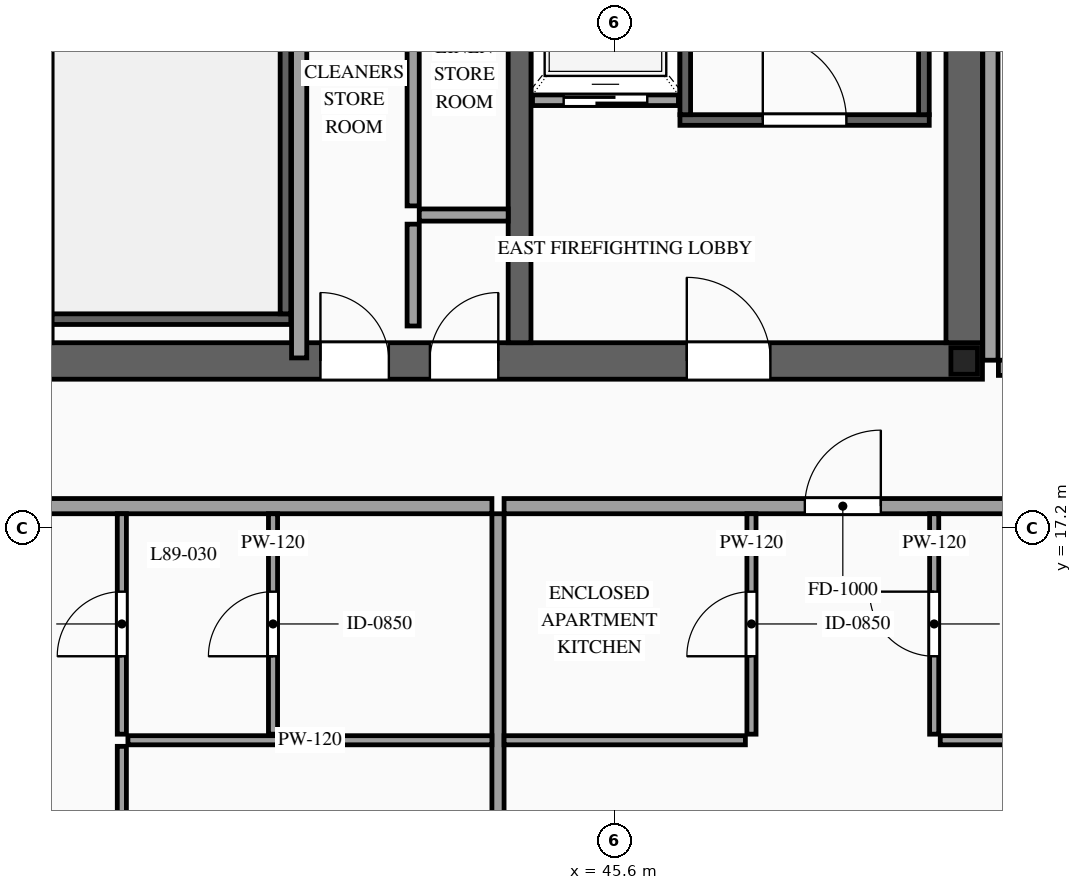
"""IFC4 building model, lengths in metres.
Left out: names, types, materials, properties, quantities, classifications, styles, units other than length and angle.
Written with IfcOpenShell. Run it as: python <this file> out.ifc"""

import sys

from ifc_helpers import new_model, si_unit, direction, frame, frame_2d, origin, origin_2d, place, context, subcontext, project, spatial, rectangle, i_section, extrude, source, transform, mapped, element, fill, save


model = new_model("IFC4")
c1 = context("Model", 3, precision=1e-05, world=origin(), true_north=direction((0.0, 1.0)))
c2 = subcontext(c1, "Body", "Model", "MODEL_VIEW")
j1 = project(units=[si_unit("LENGTHUNIT", "METRE"), si_unit("PLANEANGLEUNIT", "RADIAN")], contexts=[c1])
p1 = place(None, origin())
s1 = spatial("IfcSite", under=j1, at=p1, CompositionType="ELEMENT")
p2 = place(p1, origin())
s2 = spatial("IfcBuilding", under=s1, at=p2, CompositionType="ELEMENT")
p3 = place(p2, frame((0.0, 0.0, 332.2)))
s3 = spatial("IfcBuildingStorey", under=s2, at=p3, CompositionType="ELEMENT", Elevation=332.2)
p4 = place(p3, frame((23.56, 19.4, 0.0), z_axis=(0.0, 0.0, 1.0), x_axis=(1.0, 0.0, 0.0)))
e1 = element("IfcWall", 1, at=p4, inside=s3, PredefinedType="SHEAR", context=c2, shape_type="SweptSolid", body=[
    extrude(rectangle(XDim=26.88, YDim=0.48, at=frame_2d((13.44, 0.0))), origin(), (0.0, 0.0, 1.0), 3.5),
])
p5 = place(p4, frame((1.89, 0.0, 0.0)))
e2 = element("IfcOpeningElement", 2, at=p5, cuts=e1, PredefinedType="OPENING", context=c2, shape_type="SweptSolid", body=[
    extrude(rectangle(XDim=1.1, YDim=2.2, at=frame_2d((0.55, 1.1))), frame((0.0, 0.255, 0.0), z_axis=(0.0, -1.0, 0.0), x_axis=(1.0, 0.0, 0.0)), (0.0, 0.0, 1.0), 0.51),
])
p6 = place(p4, frame((9.79, 0.0, 0.0)))
e3 = element("IfcOpeningElement", 3, at=p6, cuts=e1, PredefinedType="OPENING", context=c2, shape_type="SweptSolid", body=[
    extrude(rectangle(XDim=1.1, YDim=2.2, at=frame_2d((0.55, 1.1))), frame((0.0, 0.255, 0.0), z_axis=(0.0, -1.0, 0.0), x_axis=(1.0, 0.0, 0.0)), (0.0, 0.0, 1.0), 0.51),
])
p7 = place(p4, frame((22.99, 0.0, 0.0)))
e4 = element("IfcOpeningElement", 4, at=p7, cuts=e1, PredefinedType="OPENING", context=c2, shape_type="SweptSolid", body=[
    extrude(rectangle(XDim=1.1, YDim=2.2, at=frame_2d((0.55, 1.1))), frame((0.0, 0.255, 0.0), z_axis=(0.0, -1.0, 0.0), x_axis=(1.0, 0.0, 0.0)), (0.0, 0.0, 1.0), 0.51),
])
p8 = place(p4, frame((19.61, 0.0, 0.0)))
e5 = element("IfcOpeningElement", 5, at=p8, cuts=e1, PredefinedType="OPENING", context=c2, shape_type="SweptSolid", body=[
    extrude(rectangle(XDim=0.9, YDim=2.15, at=frame_2d((0.45, 1.075))), frame((0.0, 0.255, 0.0), z_axis=(0.0, -1.0, 0.0), x_axis=(1.0, 0.0, 0.0)), (0.0, 0.0, 1.0), 0.51),
])
p9 = place(p4, frame((18.17, 0.0, 0.0)))
e6 = element("IfcOpeningElement", 6, at=p9, cuts=e1, PredefinedType="OPENING", context=c2, shape_type="SweptSolid", body=[
    extrude(rectangle(XDim=0.9, YDim=2.15, at=frame_2d((0.45, 1.075))), frame((0.0, 0.255, 0.0), z_axis=(0.0, -1.0, 0.0), x_axis=(1.0, 0.0, 0.0)), (0.0, 0.0, 1.0), 0.51),
])
m1 = source(origin(), c2, "Body", "SweptSolid", [
    extrude(rectangle(XDim=12.32, YDim=0.48, at=frame_2d((6.16, 0.0))), origin(), (0.0, 0.0, 1.0), 3.5),
])
p10 = place(p3, frame((50.2, 19.64, 0.0), z_axis=(0.0, 0.0, 1.0), x_axis=(0.0, 1.0, 0.0)))
e7 = element("IfcWall", 7, at=p10, inside=s3, PredefinedType="SHEAR", context=c2, shape_type="MappedRepresentation", body=[
    mapped(m1, transform((0.0, 0.0, 0.0), scale=1.0)),
])
m2 = source(origin(), c2, "Body", "SweptSolid", [
    extrude(rectangle(XDim=12.32, YDim=0.3, at=frame_2d((6.16, 0.0))), origin(), (0.0, 0.0, 1.0), 3.5),
])
p11 = place(p3, frame((38.05, 19.64, 0.0), z_axis=(0.0, 0.0, 1.0), x_axis=(0.0, 1.0, 0.0)))
e8 = element("IfcWall", 8, at=p11, inside=s3, PredefinedType="SOLIDWALL", context=c2, shape_type="MappedRepresentation", body=[
    mapped(m2, transform((0.0, 0.0, 0.0), scale=1.0)),
])
p12 = place(p3, frame((44.35, 19.64, 0.0), z_axis=(0.0, 0.0, 1.0), x_axis=(0.0, 1.0, 0.0)))
e9 = element("IfcWall", 9, at=p12, inside=s3, PredefinedType="SOLIDWALL", context=c2, shape_type="SweptSolid", body=[
    extrude(rectangle(XDim=12.32, YDim=0.3, at=frame_2d((6.16, 0.0))), origin(), (0.0, 0.0, 1.0), 3.5),
])
p13 = place(p12, frame((6.56, 0.0, 0.0)))
e10 = element("IfcOpeningElement", 10, at=p13, cuts=e9, PredefinedType="OPENING", context=c2, shape_type="SweptSolid", body=[
    extrude(rectangle(XDim=1.1, YDim=2.2, at=frame_2d((0.55, 1.1))), frame((0.0, 0.165, 0.0), z_axis=(0.0, -1.0, 0.0), x_axis=(1.0, 0.0, 0.0)), (0.0, 0.0, 1.0), 0.33),
])
p14 = place(p12, frame((8.66, 0.0, 0.0)))
e11 = element("IfcOpeningElement", 11, at=p14, cuts=e9, PredefinedType="OPENING", context=c2, shape_type="SweptSolid", body=[
    extrude(rectangle(XDim=1.1, YDim=2.2, at=frame_2d((0.55, 1.1))), frame((0.0, 0.165, 0.0), z_axis=(0.0, -1.0, 0.0), x_axis=(1.0, 0.0, 0.0)), (0.0, 0.0, 1.0), 0.33),
])
p15 = place(p12, frame((10.76, 0.0, 0.0)))
e12 = element("IfcOpeningElement", 12, at=p15, cuts=e9, PredefinedType="OPENING", context=c2, shape_type="SweptSolid", body=[
    extrude(rectangle(XDim=1.1, YDim=2.2, at=frame_2d((0.55, 1.1))), frame((0.0, 0.165, 0.0), z_axis=(0.0, -1.0, 0.0), x_axis=(1.0, 0.0, 0.0)), (0.0, 0.0, 1.0), 0.33),
])
m3 = source(origin(), c2, "Body", "SweptSolid", [
    extrude(i_section(OverallWidth=0.35, OverallDepth=0.35, WebThickness=0.012, FlangeThickness=0.019, at=origin_2d()), origin(), (0.0, 0.0, 1.0), 3.5),
])
p16 = place(p3, frame((50.2, 19.4, 0.0), z_axis=(0.0, 0.0, 1.0), x_axis=(1.0, 0.0, 0.0)))
e13 = element("IfcColumn", 13, at=p16, inside=s3, PredefinedType="COLUMN", context=c2, shape_type="MappedRepresentation", body=[
    mapped(m3, transform((0.0, 0.0, 0.0), scale=1.0)),
])
p17 = place(p3, frame((44.52, 22.83, 0.0), z_axis=(0.0, 0.0, 1.0), x_axis=(1.0, 0.0, 0.0)))
e14 = element("IfcWall", 14, at=p17, inside=s3, PredefinedType="SOLIDWALL", context=c2, shape_type="SweptSolid", body=[
    extrude(rectangle(XDim=1.92, YDim=0.14, at=frame_2d((0.96, 0.0))), origin(), (0.0, 0.0, 1.0), 3.28),
])
p18 = place(p17, frame((0.41, 0.0, 0.0)))
e15 = element("IfcOpeningElement", 15, at=p18, cuts=e14, PredefinedType="OPENING", context=c2, shape_type="SweptSolid", body=[
    extrude(rectangle(XDim=1.1, YDim=2.2, at=frame_2d((0.55, 1.1))), frame((0.0, 0.085, 0.0), z_axis=(0.0, -1.0, 0.0), x_axis=(1.0, 0.0, 0.0)), (0.0, 0.0, 1.0), 0.17),
])
p19 = place(p3, frame((46.46, 22.57, 0.0), z_axis=(0.0, 0.0, 1.0), x_axis=(1.0, 0.0, 0.0)))
e16 = element("IfcWall", 16, at=p19, inside=s3, PredefinedType="SOLIDWALL", context=c2, shape_type="SweptSolid", body=[
    extrude(rectangle(XDim=3.28, YDim=0.14, at=frame_2d((1.64, 0.0))), origin(), (0.0, 0.0, 1.0), 3.28),
])
p20 = place(p19, frame((1.09, 0.0, 0.0)))
e17 = element("IfcOpeningElement", 17, at=p20, cuts=e16, PredefinedType="OPENING", context=c2, shape_type="SweptSolid", body=[
    extrude(rectangle(XDim=1.1, YDim=2.2, at=frame_2d((0.55, 1.1))), frame((0.0, 0.085, 0.0), z_axis=(0.0, -1.0, 0.0), x_axis=(1.0, 0.0, 0.0)), (0.0, 0.0, 1.0), 0.17),
])
m4 = source(origin(), c2, "Body", "SweptSolid", [
    extrude(rectangle(XDim=8.94, YDim=0.14, at=frame_2d((4.47, 0.0))), origin(), (0.0, 0.0, 1.0), 3.28),
])
for number, where, z_axis, x_axis in (
    (18, (46.53, 22.64, 0.0), (0.0, 0.0, 1.0), (0.0, 1.0, 0.0)),
    (19, (49.67, 22.64, 0.0), (0.0, 0.0, 1.0), (0.0, 1.0, 0.0)),
):
    element("IfcWall", number, at=place(p3, frame(where, z_axis=z_axis, x_axis=x_axis)), inside=s3, PredefinedType="SOLIDWALL", context=c2, shape_type="MappedRepresentation", body=[
        mapped(m4, transform((0.0, 0.0, 0.0), scale=1.0)),
    ])
m5 = source(origin(), c2, "Body", "SweptSolid", [
    extrude(rectangle(XDim=3.14, YDim=0.14, at=frame_2d((1.57, 0.0))), origin(), (0.0, 0.0, 1.0), 3.28),
])
p21 = place(p3, frame((38.2, 19.95, 0.0), z_axis=(0.0, 0.0, 1.0), x_axis=(1.0, 0.0, 0.0)))
e20 = element("IfcWall", 20, at=p21, inside=s3, PredefinedType="SOLIDWALL", context=c2, shape_type="MappedRepresentation", body=[
    mapped(m5, transform((0.0, 0.0, 0.0), scale=1.0)),
])
m6 = source(origin(), c2, "Body", "SweptSolid", [
    extrude(rectangle(XDim=8.94, YDim=0.14, at=frame_2d((4.47, 0.0))), origin(), (0.0, 0.0, 1.0), 3.28),
])
p22 = place(p3, frame((41.27, 20.02, 0.0), z_axis=(0.0, 0.0, 1.0), x_axis=(0.0, 1.0, 0.0)))
e21 = element("IfcWall", 21, at=p22, inside=s3, PredefinedType="SOLIDWALL", context=c2, shape_type="MappedRepresentation", body=[
    mapped(m6, transform((0.0, 0.0, 0.0), scale=1.0)),
])
m7 = source(origin(), c2, "Body", "SweptSolid", [
    extrude(rectangle(XDim=1.34, YDim=0.16, at=frame_2d((0.67, 0.0))), origin(), (0.0, 0.0, 1.0), 3.28),
])
p23 = place(p3, frame((42.95, 19.86, 0.0), z_axis=(0.0, 0.0, 1.0), x_axis=(0.0, 1.0, 0.0)))
e22 = element("IfcWall", 22, at=p23, inside=s3, PredefinedType="PARTITIONING", context=c2, shape_type="MappedRepresentation", body=[
    mapped(m7, transform((0.0, 0.0, 0.0), scale=1.0)),
])
m8 = source(origin(), c2, "Body", "SweptSolid", [
    extrude(rectangle(XDim=1.17, YDim=0.16, at=frame_2d((0.585, 0.0))), origin(), (0.0, 0.0, 1.0), 3.28),
])
p24 = place(p3, frame((43.03, 21.32, 0.0), z_axis=(0.0, 0.0, 1.0), x_axis=(1.0, 0.0, 0.0)))
e23 = element("IfcWall", 23, at=p24, inside=s3, PredefinedType="PARTITIONING", context=c2, shape_type="MappedRepresentation", body=[
    mapped(m8, transform((0.0, 0.0, 0.0), scale=1.0)),
])
m9 = source(origin(), c2, "Body", "SweptSolid", [
    extrude(rectangle(XDim=6.06, YDim=0.2, at=frame_2d((3.03, 0.0))), origin(), (0.0, 0.0, 1.0), 3.28),
])
p25 = place(p3, frame((41.45, 19.44, 0.0), z_axis=(0.0, 0.0, 1.0), x_axis=(0.0, 1.0, 0.0)))
e24 = element("IfcWall", 24, at=p25, inside=s3, PredefinedType="PARTITIONING", context=c2, shape_type="MappedRepresentation", body=[
    mapped(m9, transform((0.0, 0.0, 0.0), scale=1.0)),
])
m10 = source(origin(), c2, "Body", "SweptSolid", [
    extrude(rectangle(XDim=4.06, YDim=0.16, at=frame_2d((2.03, 0.0))), origin(), (0.0, 0.0, 1.0), 3.28),
])
p26 = place(p3, frame((42.95, 21.44, 0.0), z_axis=(0.0, 0.0, 1.0), x_axis=(0.0, 1.0, 0.0)))
e25 = element("IfcWall", 25, at=p26, inside=s3, PredefinedType="PARTITIONING", context=c2, shape_type="MappedRepresentation", body=[
    mapped(m10, transform((0.0, 0.0, 0.0), scale=1.0)),
])
p27 = place(p3, frame((32.583, 17.49, 0.0), z_axis=(0.0, 0.0, 1.0), x_axis=(1.0, 0.0, 0.0)))
e26 = element("IfcWall", 26, at=p27, inside=s3, PredefinedType="PARTITIONING", context=c2, shape_type="SweptSolid", body=[
    extrude(rectangle(XDim=11.403, YDim=0.2, at=frame_2d((5.702, 0.0))), origin(), (0.0, 0.0, 1.0), 3.28),
])
p28 = place(p27, frame((4.517, 0.0, 0.0)))
e27 = element("IfcOpeningElement", 27, at=p28, cuts=e26, PredefinedType="OPENING", context=c2, shape_type="SweptSolid", body=[
    extrude(rectangle(XDim=1.0, YDim=2.2, at=frame_2d((0.5, 1.1))), frame((0.0, 0.115, 0.0), z_axis=(0.0, -1.0, 0.0), x_axis=(1.0, 0.0, 0.0)), (0.0, 0.0, 1.0), 0.23),
])
m11 = source(origin(), c2, "Body", "SweptSolid", [
    extrude(rectangle(XDim=10.54, YDim=0.16, at=frame_2d((5.27, 0.0))), origin(), (0.0, 0.0, 1.0), 3.28),
])
p29 = place(p3, frame((44.066, 6.85, 0.0), z_axis=(0.0, 0.0, 1.0), x_axis=(0.0, 1.0, 0.0)))
e28 = element("IfcWall", 28, at=p29, inside=s3, PredefinedType="PARTITIONING", context=c2, shape_type="MappedRepresentation", body=[
    mapped(m11, transform((0.0, 0.0, 0.0), scale=1.0)),
])
p30 = place(p3, frame((41.106, 14.49, 0.0), z_axis=(0.0, 0.0, 1.0), x_axis=(0.0, 1.0, 0.0)))
e29 = element("IfcWall", 29, at=p30, inside=s3, PredefinedType="PARTITIONING", context=c2, shape_type="SweptSolid", body=[
    extrude(rectangle(XDim=2.9, YDim=0.12, at=frame_2d((1.45, 0.0))), origin(), (0.0, 0.0, 1.0), 3.28),
])
p31 = place(p30, frame((1.025, 0.0, 0.0)))
e30 = element("IfcOpeningElement", 30, at=p31, cuts=e29, PredefinedType="OPENING", context=c2, shape_type="SweptSolid", body=[
    extrude(rectangle(XDim=0.85, YDim=2.1, at=frame_2d((0.425, 1.05))), frame((0.0, 0.075, 0.0), z_axis=(0.0, -1.0, 0.0), x_axis=(1.0, 0.0, 0.0)), (0.0, 0.0, 1.0), 0.15),
])
m12 = source(origin(), c2, "Body", "SweptSolid", [
    extrude(rectangle(XDim=4.789, YDim=0.12, at=frame_2d((2.395, 0.0))), origin(), (0.0, 0.0, 1.0), 3.28),
])
p32 = place(p3, frame((39.197, 14.41, 0.0), z_axis=(0.0, 0.0, 1.0), x_axis=(1.0, 0.0, 0.0)))
e31 = element("IfcWall", 31, at=p32, inside=s3, PredefinedType="PARTITIONING", context=c2, shape_type="MappedRepresentation", body=[
    mapped(m12, transform((0.0, 0.0, 0.0), scale=1.0)),
])
p33 = place(p3, frame((39.117, 6.85, 0.0), z_axis=(0.0, 0.0, 1.0), x_axis=(0.0, 1.0, 0.0)))
e32 = element("IfcWall", 32, at=p33, inside=s3, PredefinedType="PARTITIONING", context=c2, shape_type="SweptSolid", body=[
    extrude(rectangle(XDim=7.48, YDim=0.12, at=frame_2d((3.74, 0.0))), origin(), (0.0, 0.0, 1.0), 3.28),
])
p34 = place(p33, frame((3.29, 0.0, 0.0)))
e33 = element("IfcOpeningElement", 33, at=p34, cuts=e32, PredefinedType="OPENING", context=c2, shape_type="SweptSolid", body=[
    extrude(rectangle(XDim=0.9, YDim=2.15, at=frame_2d((0.45, 1.075))), frame((0.0, 0.075, 0.0), z_axis=(0.0, -1.0, 0.0), x_axis=(1.0, 0.0, 0.0)), (0.0, 0.0, 1.0), 0.15),
])
p35 = place(p3, frame((39.117, 14.49, 0.0), z_axis=(0.0, 0.0, 1.0), x_axis=(0.0, 1.0, 0.0)))
e34 = element("IfcWall", 34, at=p35, inside=s3, PredefinedType="PARTITIONING", context=c2, shape_type="SweptSolid", body=[
    extrude(rectangle(XDim=2.9, YDim=0.12, at=frame_2d((1.45, 0.0))), origin(), (0.0, 0.0, 1.0), 3.28),
])
p36 = place(p35, frame((1.025, 0.0, 0.0)))
e35 = element("IfcOpeningElement", 35, at=p36, cuts=e34, PredefinedType="OPENING", context=c2, shape_type="SweptSolid", body=[
    extrude(rectangle(XDim=0.85, YDim=2.1, at=frame_2d((0.425, 1.05))), frame((0.0, 0.075, 0.0), z_axis=(0.0, -1.0, 0.0), x_axis=(1.0, 0.0, 0.0)), (0.0, 0.0, 1.0), 0.15),
])
p37 = place(p3, frame((44.146, 17.49, 0.0), z_axis=(0.0, 0.0, 1.0), x_axis=(1.0, 0.0, 0.0)))
e36 = element("IfcWall", 36, at=p37, inside=s3, PredefinedType="PARTITIONING", context=c2, shape_type="SweptSolid", body=[
    extrude(rectangle(XDim=8.914, YDim=0.2, at=frame_2d((4.457, 0.0))), origin(), (0.0, 0.0, 1.0), 3.28),
])
p38 = place(p37, frame((3.957, 0.0, 0.0)))
e37 = element("IfcOpeningElement", 37, at=p38, cuts=e36, PredefinedType="OPENING", context=c2, shape_type="SweptSolid", body=[
    extrude(rectangle(XDim=1.0, YDim=2.2, at=frame_2d((0.5, 1.1))), frame((0.0, 0.115, 0.0), z_axis=(0.0, -1.0, 0.0), x_axis=(1.0, 0.0, 0.0)), (0.0, 0.0, 1.0), 0.23),
])
m13 = source(origin(), c2, "Body", "SweptSolid", [
    extrude(rectangle(XDim=3.175, YDim=0.12, at=frame_2d((1.587, 0.0))), origin(), (0.0, 0.0, 1.0), 3.28),
])
p39 = place(p3, frame((44.146, 14.41, 0.0), z_axis=(0.0, 0.0, 1.0), x_axis=(1.0, 0.0, 0.0)))
e38 = element("IfcWall", 38, at=p39, inside=s3, PredefinedType="PARTITIONING", context=c2, shape_type="MappedRepresentation", body=[
    mapped(m13, transform((0.0, 0.0, 0.0), scale=1.0)),
])
p40 = place(p3, frame((47.401, 14.49, 0.0), z_axis=(0.0, 0.0, 1.0), x_axis=(0.0, 1.0, 0.0)))
e39 = element("IfcWall", 39, at=p40, inside=s3, PredefinedType="PARTITIONING", context=c2, shape_type="SweptSolid", body=[
    extrude(rectangle(XDim=2.9, YDim=0.12, at=frame_2d((1.45, 0.0))), origin(), (0.0, 0.0, 1.0), 3.28),
])
p41 = place(p40, frame((1.025, 0.0, 0.0)))
e40 = element("IfcOpeningElement", 40, at=p41, cuts=e39, PredefinedType="OPENING", context=c2, shape_type="SweptSolid", body=[
    extrude(rectangle(XDim=0.85, YDim=2.1, at=frame_2d((0.425, 1.05))), frame((0.0, 0.075, 0.0), z_axis=(0.0, -1.0, 0.0), x_axis=(1.0, 0.0, 0.0)), (0.0, 0.0, 1.0), 0.15),
])
p42 = place(p3, frame((49.885, 14.41, 0.0), z_axis=(0.0, 0.0, 1.0), x_axis=(1.0, 0.0, 0.0)))
e41 = element("IfcWall", 41, at=p42, inside=s3, PredefinedType="PARTITIONING", context=c2, shape_type="MappedRepresentation", body=[
    mapped(m13, transform((0.0, 0.0, 0.0), scale=1.0)),
])
p43 = place(p3, frame((49.805, 14.49, 0.0), z_axis=(0.0, 0.0, 1.0), x_axis=(0.0, 1.0, 0.0)))
e42 = element("IfcWall", 42, at=p43, inside=s3, PredefinedType="PARTITIONING", context=c2, shape_type="SweptSolid", body=[
    extrude(rectangle(XDim=2.9, YDim=0.12, at=frame_2d((1.45, 0.0))), origin(), (0.0, 0.0, 1.0), 3.28),
])
p44 = place(p43, frame((1.025, 0.0, 0.0)))
e43 = element("IfcOpeningElement", 43, at=p44, cuts=e42, PredefinedType="OPENING", context=c2, shape_type="SweptSolid", body=[
    extrude(rectangle(XDim=0.85, YDim=2.1, at=frame_2d((0.425, 1.05))), frame((0.0, 0.075, 0.0), z_axis=(0.0, -1.0, 0.0), x_axis=(1.0, 0.0, 0.0)), (0.0, 0.0, 1.0), 0.15),
])
p45 = place(p3, frame((50.65, 19.31, 0.0), z_axis=(0.0, 0.0, 1.0), x_axis=(1.0, 0.0, 0.0)))
e44 = element("IfcWall", 44, at=p45, inside=s3, PredefinedType="PARTITIONING", context=c2, shape_type="SweptSolid", body=[
    extrude(rectangle(XDim=5.3, YDim=0.2, at=frame_2d((2.65, 0.0))), origin(), (0.0, 0.0, 1.0), 2.825),
])
p46 = place(p45, frame((0.4, 0.0, 0.0)))
e45 = element("IfcOpeningElement", 45, at=p46, cuts=e44, PredefinedType="OPENING", context=c2, shape_type="SweptSolid", body=[
    extrude(rectangle(XDim=1.0, YDim=2.2, at=frame_2d((0.5, 1.1))), frame((0.0, 0.115, 0.0), z_axis=(0.0, -1.0, 0.0), x_axis=(1.0, 0.0, 0.0)), (0.0, 0.0, 1.0), 0.23),
])
m14 = source(origin(), c2, "Body", "SweptSolid", [
    extrude(rectangle(XDim=12.78, YDim=0.2, at=frame_2d((6.39, 0.0))), origin(), (0.0, 0.0, 1.0), 3.28),
])
p47 = place(p3, frame((50.545, 19.41, 0.0), z_axis=(0.0, 0.0, 1.0), x_axis=(0.0, 1.0, 0.0)))
e46 = element("IfcWall", 46, at=p47, inside=s3, PredefinedType="PARTITIONING", context=c2, shape_type="MappedRepresentation", body=[
    mapped(m14, transform((0.0, 0.0, 0.0), scale=1.0)),
])
m15 = source(origin(), c2, "Body", "SweptSolid", [
    extrude(rectangle(XDim=1.1, YDim=2.2, at=frame_2d((0.55, 1.1))), frame((0.0, 0.025, 0.0), z_axis=(0.0, -1.0, 0.0), x_axis=(1.0, 0.0, 0.0)), (0.0, 0.0, 1.0), 0.05),
])
p48 = place(p18, origin())
e47 = element("IfcDoor", 47, at=p48, inside=s3, OperationType="SLIDING_TO_RIGHT", PredefinedType="DOOR", context=c2, shape_type="MappedRepresentation", body=[
    mapped(m15, transform((0.0, 0.0, 0.0), scale=1.0)),
])
fill(e15, e47)
m16 = source(origin(), c2, "Body", "SweptSolid", [
    extrude(rectangle(XDim=1.1, YDim=2.2, at=frame_2d((0.55, 1.1))), frame((0.0, 0.025, 0.0), z_axis=(0.0, -1.0, 0.0), x_axis=(1.0, 0.0, 0.0)), (0.0, 0.0, 1.0), 0.05),
])
p49 = place(p20, origin())
e48 = element("IfcDoor", 48, at=p49, inside=s3, OperationType="SINGLE_SWING_LEFT", PredefinedType="DOOR", context=c2, shape_type="MappedRepresentation", body=[
    mapped(m16, transform((0.0, 0.0, 0.0), scale=1.0)),
])
fill(e17, e48)
p50 = place(p7, origin())
e49 = element("IfcDoor", 49, at=p50, inside=s3, OperationType="SINGLE_SWING_LEFT", PredefinedType="DOOR", context=c2, shape_type="MappedRepresentation", body=[
    mapped(m16, transform((0.0, 0.0, 0.0), scale=1.0)),
])
fill(e4, e49)
m17 = source(origin(), c2, "Body", "SweptSolid", [
    extrude(rectangle(XDim=0.9, YDim=2.15, at=frame_2d((0.45, 1.075))), frame((0.0, 0.025, 0.0), z_axis=(0.0, -1.0, 0.0), x_axis=(1.0, 0.0, 0.0)), (0.0, 0.0, 1.0), 0.05),
])
p51 = place(p8, origin())
e50 = element("IfcDoor", 50, at=p51, inside=s3, OperationType="SINGLE_SWING_RIGHT", PredefinedType="DOOR", context=c2, shape_type="MappedRepresentation", body=[
    mapped(m17, transform((0.0, 0.0, 0.0), scale=1.0)),
])
fill(e5, e50)
p52 = place(p9, origin())
e51 = element("IfcDoor", 51, at=p52, inside=s3, OperationType="SINGLE_SWING_LEFT", PredefinedType="DOOR", context=c2, shape_type="MappedRepresentation", body=[
    mapped(m17, transform((0.0, 0.0, 0.0), scale=1.0)),
])
fill(e6, e51)
m18 = source(origin(), c2, "Body", "SweptSolid", [
    extrude(rectangle(XDim=0.85, YDim=2.1, at=frame_2d((0.425, 1.05))), frame((0.0, 0.025, 0.0), z_axis=(0.0, -1.0, 0.0), x_axis=(1.0, 0.0, 0.0)), (0.0, 0.0, 1.0), 0.05),
])
p53 = place(p31, origin())
e52 = element("IfcDoor", 52, at=p53, inside=s3, OperationType="SINGLE_SWING_LEFT", PredefinedType="DOOR", context=c2, shape_type="MappedRepresentation", body=[
    mapped(m18, transform((0.0, 0.0, 0.0), scale=1.0)),
])
fill(e30, e52)
p54 = place(p36, origin())
e53 = element("IfcDoor", 53, at=p54, inside=s3, OperationType="SINGLE_SWING_LEFT", PredefinedType="DOOR", context=c2, shape_type="MappedRepresentation", body=[
    mapped(m18, transform((0.0, 0.0, 0.0), scale=1.0)),
])
fill(e35, e53)
m19 = source(origin(), c2, "Body", "SweptSolid", [
    extrude(rectangle(XDim=1.0, YDim=2.2, at=frame_2d((0.5, 1.1))), frame((0.0, 0.025, 0.0), z_axis=(0.0, -1.0, 0.0), x_axis=(1.0, 0.0, 0.0)), (0.0, 0.0, 1.0), 0.05),
])
p55 = place(p38, origin())
e54 = element("IfcDoor", 54, at=p55, inside=s3, OperationType="SINGLE_SWING_RIGHT", PredefinedType="DOOR", context=c2, shape_type="MappedRepresentation", body=[
    mapped(m19, transform((0.0, 0.0, 0.0), scale=1.0)),
])
fill(e37, e54)
p56 = place(p41, origin())
e55 = element("IfcDoor", 55, at=p56, inside=s3, OperationType="SINGLE_SWING_LEFT", PredefinedType="DOOR", context=c2, shape_type="MappedRepresentation", body=[
    mapped(m18, transform((0.0, 0.0, 0.0), scale=1.0)),
])
fill(e40, e55)
p57 = place(p44, origin())
e56 = element("IfcDoor", 56, at=p57, inside=s3, OperationType="SINGLE_SWING_RIGHT", PredefinedType="DOOR", context=c2, shape_type="MappedRepresentation", body=[
    mapped(m18, transform((0.0, 0.0, 0.0), scale=1.0)),
])
fill(e43, e56)
save(model, sys.argv[1])
